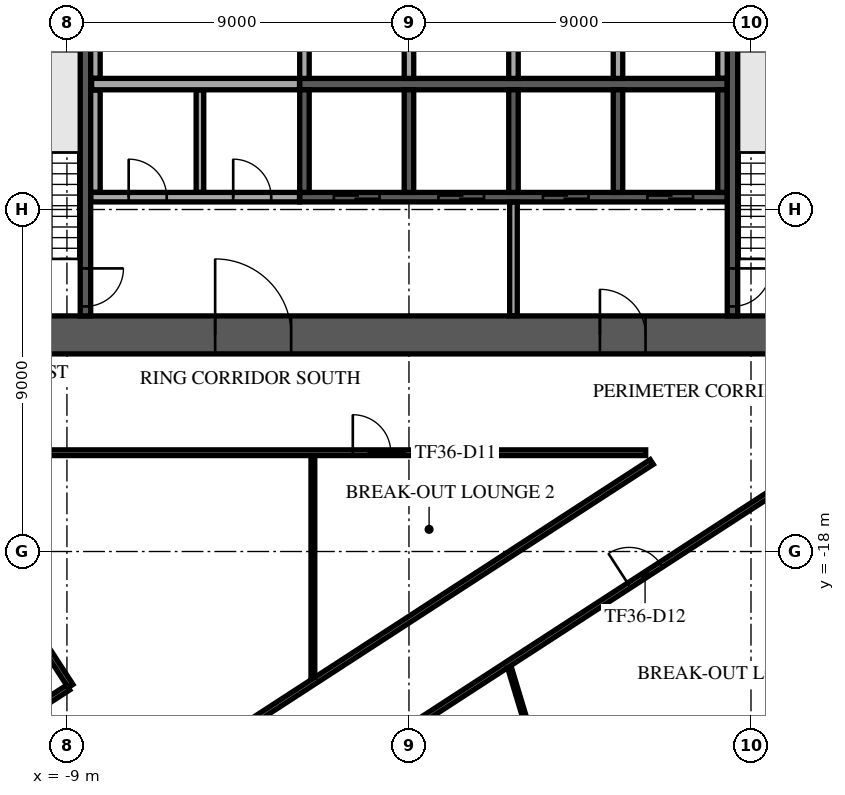
"""IFC4 building model, lengths in metres.
Left out: names, types, materials, properties, quantities, classifications, styles, units other than length and angle.
Written with IfcOpenShell. Run it as: python <this file> out.ifc"""

import sys

from ifc_helpers import new_model, si_unit, direction, frame, frame_2d, origin, place, context, subcontext, project, spatial, rectangle, extrude, element, fill, save


model = new_model("IFC4")
c1 = context("Model", 3, precision=1e-05, world=origin(), true_north=direction((0.0, 1.0)))
c2 = subcontext(c1, "Body", "Model", "MODEL_VIEW")
j1 = project(units=[si_unit("LENGTHUNIT", "METRE"), si_unit("PLANEANGLEUNIT", "RADIAN")], contexts=[c1])
p1 = place(None, origin())
s1 = spatial("IfcSite", under=j1, at=p1, CompositionType="ELEMENT")
p2 = place(p1, origin())
s2 = spatial("IfcBuilding", under=s1, at=p2, CompositionType="ELEMENT")
p3 = place(p2, frame((0.0, 0.0, 155.7)))
s3 = spatial("IfcBuildingStorey", under=s2, at=p3, CompositionType="ELEMENT", Elevation=155.7)
p4 = place(p3, frame((-12.8, -12.3, 0.0), z_axis=(0.0, 0.0, 1.0), x_axis=(1.0, 0.0, 0.0)))
e1 = element("IfcWall", 1, at=p4, inside=s3, PredefinedType="SHEAR", context=c2, shape_type="SweptSolid", body=[
    extrude(rectangle(XDim=25.6, YDim=1.0, at=frame_2d((12.8, 0.0))), origin(), (0.0, 0.0, 1.0), 3.6),
])
p5 = place(p4, frame((7.7, 0.0, 0.0)))
e2 = element("IfcOpeningElement", 2, at=p5, cuts=e1, PredefinedType="OPENING", context=c2, shape_type="SweptSolid", body=[
    extrude(rectangle(XDim=2.0, YDim=2.1, at=frame_2d((1.0, 1.05))), frame((0.0, 0.51, 0.0), z_axis=(0.0, -1.0, 0.0), x_axis=(1.0, 0.0, 0.0)), (0.0, 0.0, 1.0), 1.02),
])
p6 = place(p4, frame((17.825, 0.0, 0.0)))
e3 = element("IfcOpeningElement", 3, at=p6, cuts=e1, PredefinedType="OPENING", context=c2, shape_type="SweptSolid", body=[
    extrude(rectangle(XDim=1.2, YDim=2.1, at=frame_2d((0.6, 1.05))), frame((0.0, 0.51, 0.0), z_axis=(0.0, -1.0, 0.0), x_axis=(1.0, 0.0, 0.0)), (0.0, 0.0, 1.0), 1.02),
])
p7 = place(p4, frame((1.975, 0.0, 0.0)))
e4 = element("IfcOpeningElement", 4, at=p7, cuts=e1, PredefinedType="OPENING", context=c2, shape_type="SweptSolid", body=[
    extrude(rectangle(XDim=1.2, YDim=2.1, at=frame_2d((0.6, 1.05))), frame((0.0, 0.51, 0.0), z_axis=(0.0, -1.0, 0.0), x_axis=(1.0, 0.0, 0.0)), (0.0, 0.0, 1.0), 1.02),
])
p8 = place(p4, frame((22.425, 0.0, 0.0)))
e5 = element("IfcOpeningElement", 5, at=p8, cuts=e1, PredefinedType="OPENING", context=c2, shape_type="SweptSolid", body=[
    extrude(rectangle(XDim=1.2, YDim=2.1, at=frame_2d((0.6, 1.05))), frame((0.0, 0.51, 0.0), z_axis=(0.0, -1.0, 0.0), x_axis=(1.0, 0.0, 0.0)), (0.0, 0.0, 1.0), 1.02),
])
p9 = place(p3, frame((-2.875, -5.7, 0.0), z_axis=(0.0, 0.0, 1.0), x_axis=(1.0, 0.0, 0.0)))
e6 = element("IfcWall", 6, at=p9, inside=s3, PredefinedType="SOLIDWALL", context=c2, shape_type="SweptSolid", body=[
    extrude(rectangle(XDim=11.25, YDim=0.3, at=frame_2d((5.625, 0.0))), origin(), (0.0, 0.0, 1.0), 3.6),
])
for number, where, z_axis, x_axis in (
    (7, (-2.75, -5.55, 0.0), (0.0, 0.0, 1.0), (0.0, 1.0, 0.0)),
    (8, (0.0, -5.55, 0.0), (0.0, 0.0, 1.0), (0.0, 1.0, 0.0)),
    (9, (2.75, -5.55, 0.0), (0.0, 0.0, 1.0), (0.0, 1.0, 0.0)),
    (10, (5.5, -5.55, 0.0), (0.0, 0.0, 1.0), (0.0, 1.0, 0.0)),
):
    element("IfcWall", number, at=place(p3, frame(where, z_axis=z_axis, x_axis=x_axis)), inside=s3, PredefinedType="SOLIDWALL", context=c2, shape_type="SweptSolid", body=[
        extrude(rectangle(XDim=2.7, YDim=0.25, at=frame_2d((1.35, 0.0))), origin(), (0.0, 0.0, 1.0), 3.6),
    ])
p10 = place(p3, frame((-2.875, -8.675, 0.0), z_axis=(0.0, 0.0, 1.0), x_axis=(1.0, 0.0, 0.0)))
e11 = element("IfcWall", 11, at=p10, inside=s3, PredefinedType="SOLIDWALL", context=c2, shape_type="SweptSolid", body=[
    extrude(rectangle(XDim=11.25, YDim=0.25, at=frame_2d((5.625, 0.0))), origin(), (0.0, 0.0, 1.0), 3.6),
])
p11 = place(p10, frame((0.9, 0.0, 0.0)))
e12 = element("IfcOpeningElement", 12, at=p11, cuts=e11, PredefinedType="OPENING", context=c2, shape_type="SweptSolid", body=[
    extrude(rectangle(XDim=1.2, YDim=2.1, at=frame_2d((0.6, 1.05))), frame((0.0, 0.135, 0.0), z_axis=(0.0, -1.0, 0.0), x_axis=(1.0, 0.0, 0.0)), (0.0, 0.0, 1.0), 0.27),
])
p12 = place(p10, frame((3.65, 0.0, 0.0)))
e13 = element("IfcOpeningElement", 13, at=p12, cuts=e11, PredefinedType="OPENING", context=c2, shape_type="SweptSolid", body=[
    extrude(rectangle(XDim=1.2, YDim=2.1, at=frame_2d((0.6, 1.05))), frame((0.0, 0.135, 0.0), z_axis=(0.0, -1.0, 0.0), x_axis=(1.0, 0.0, 0.0)), (0.0, 0.0, 1.0), 0.27),
])
p13 = place(p10, frame((6.4, 0.0, 0.0)))
e14 = element("IfcOpeningElement", 14, at=p13, cuts=e11, PredefinedType="OPENING", context=c2, shape_type="SweptSolid", body=[
    extrude(rectangle(XDim=1.2, YDim=2.1, at=frame_2d((0.6, 1.05))), frame((0.0, 0.135, 0.0), z_axis=(0.0, -1.0, 0.0), x_axis=(1.0, 0.0, 0.0)), (0.0, 0.0, 1.0), 0.27),
])
p14 = place(p10, frame((9.15, 0.0, 0.0)))
e15 = element("IfcOpeningElement", 15, at=p14, cuts=e11, PredefinedType="OPENING", context=c2, shape_type="SweptSolid", body=[
    extrude(rectangle(XDim=1.2, YDim=2.1, at=frame_2d((0.6, 1.05))), frame((0.0, 0.135, 0.0), z_axis=(0.0, -1.0, 0.0), x_axis=(1.0, 0.0, 0.0)), (0.0, 0.0, 1.0), 0.27),
])
for number, where, z_axis, x_axis in (
    (16, (-2.75, -8.55, 0.0), (0.0, 0.0, 1.0), (0.0, 1.0, 0.0)),
    (17, (0.0, -8.55, 0.0), (0.0, 0.0, 1.0), (0.0, 1.0, 0.0)),
    (18, (2.75, -8.55, 0.0), (0.0, 0.0, 1.0), (0.0, 1.0, 0.0)),
    (19, (5.5, -8.55, 0.0), (0.0, 0.0, 1.0), (0.0, 1.0, 0.0)),
    (20, (8.25, -8.55, 0.0), (0.0, 0.0, 1.0), (0.0, 1.0, 0.0)),
):
    element("IfcWall", number, at=place(p3, frame(where, z_axis=z_axis, x_axis=x_axis)), inside=s3, PredefinedType="SOLIDWALL", context=c2, shape_type="SweptSolid", body=[
        extrude(rectangle(XDim=2.7, YDim=0.25, at=frame_2d((1.35, 0.0))), origin(), (0.0, 0.0, 1.0), 3.6),
    ])
p15 = place(p3, frame((-8.512, -4.55, 0.0), z_axis=(0.0, 0.0, 1.0), x_axis=(0.0, -1.0, 0.0)))
e21 = element("IfcWall", 21, at=p15, inside=s3, PredefinedType="SOLIDWALL", context=c2, shape_type="SweptSolid", body=[
    extrude(rectangle(XDim=7.25, YDim=0.275, at=frame_2d((3.625, 0.0))), origin(), (0.0, 0.0, 1.0), 3.6),
])
p16 = place(p15, frame((6.0, 0.0, 0.0)))
e22 = element("IfcOpeningElement", 22, at=p16, cuts=e21, PredefinedType="OPENING", context=c2, shape_type="SweptSolid", body=[
    extrude(rectangle(XDim=1.0, YDim=2.1, at=frame_2d((0.5, 1.05))), frame((0.0, 0.147, 0.0), z_axis=(0.0, -1.0, 0.0), x_axis=(1.0, 0.0, 0.0)), (0.0, 0.0, 1.0), 0.295),
])
p17 = place(p3, frame((8.512, -4.55, 0.0), z_axis=(0.0, 0.0, 1.0), x_axis=(0.0, -1.0, 0.0)))
e23 = element("IfcWall", 23, at=p17, inside=s3, PredefinedType="SOLIDWALL", context=c2, shape_type="SweptSolid", body=[
    extrude(rectangle(XDim=7.25, YDim=0.275, at=frame_2d((3.625, 0.0))), origin(), (0.0, 0.0, 1.0), 3.6),
])
p18 = place(p17, frame((6.0, 0.0, 0.0)))
e24 = element("IfcOpeningElement", 24, at=p18, cuts=e23, PredefinedType="OPENING", context=c2, shape_type="SweptSolid", body=[
    extrude(rectangle(XDim=1.0, YDim=2.1, at=frame_2d((0.5, 1.05))), frame((0.0, 0.147, 0.0), z_axis=(0.0, -1.0, 0.0), x_axis=(1.0, 0.0, 0.0)), (0.0, 0.0, 1.0), 0.295),
])
p19 = place(p3, frame((2.75, -11.795, 0.0), z_axis=(0.0, 0.0, 1.0), x_axis=(0.0, 1.0, 0.0)))
e25 = element("IfcWall", 25, at=p19, inside=s3, PredefinedType="PARTITIONING", context=c2, shape_type="SweptSolid", body=[
    extrude(rectangle(XDim=2.99, YDim=0.2, at=frame_2d((1.495, 0.0))), origin(), (0.0, 0.0, 1.0), 3.6),
])
p20 = place(p3, frame((-8.37, -8.675, 0.0), z_axis=(0.0, 0.0, 1.0), x_axis=(1.0, 0.0, 0.0)))
e26 = element("IfcWall", 26, at=p20, inside=s3, PredefinedType="PARTITIONING", context=c2, shape_type="SweptSolid", body=[
    extrude(rectangle(XDim=5.49, YDim=0.25, at=frame_2d((2.745, 0.0))), origin(), (0.0, 0.0, 1.0), 3.6),
])
p21 = place(p20, frame((0.995, 0.0, 0.0)))
e27 = element("IfcOpeningElement", 27, at=p21, cuts=e26, PredefinedType="OPENING", context=c2, shape_type="SweptSolid", body=[
    extrude(rectangle(XDim=1.0, YDim=2.1, at=frame_2d((0.5, 1.05))), frame((0.0, 0.135, 0.0), z_axis=(0.0, -1.0, 0.0), x_axis=(1.0, 0.0, 0.0)), (0.0, 0.0, 1.0), 0.27),
])
p22 = place(p20, frame((3.745, 0.0, 0.0)))
e28 = element("IfcOpeningElement", 28, at=p22, cuts=e26, PredefinedType="OPENING", context=c2, shape_type="SweptSolid", body=[
    extrude(rectangle(XDim=1.0, YDim=2.1, at=frame_2d((0.5, 1.05))), frame((0.0, 0.135, 0.0), z_axis=(0.0, -1.0, 0.0), x_axis=(1.0, 0.0, 0.0)), (0.0, 0.0, 1.0), 0.27),
])
p23 = place(p3, frame((-8.25, -8.545, 0.0), z_axis=(0.0, 0.0, 1.0), x_axis=(0.0, 1.0, 0.0)))
e29 = element("IfcWall", 29, at=p23, inside=s3, PredefinedType="PARTITIONING", context=c2, shape_type="SweptSolid", body=[
    extrude(rectangle(XDim=2.69, YDim=0.25, at=frame_2d((1.345, 0.0))), origin(), (0.0, 0.0, 1.0), 3.6),
])
p24 = place(p3, frame((-5.5, -8.545, 0.0), z_axis=(0.0, 0.0, 1.0), x_axis=(0.0, 1.0, 0.0)))
e30 = element("IfcWall", 30, at=p24, inside=s3, PredefinedType="PARTITIONING", context=c2, shape_type="SweptSolid", body=[
    extrude(rectangle(XDim=2.69, YDim=0.2, at=frame_2d((1.345, 0.0))), origin(), (0.0, 0.0, 1.0), 3.6),
])
p25 = place(p3, frame((-8.35, -5.7, 0.0), z_axis=(0.0, 0.0, 1.0), x_axis=(1.0, 0.0, 0.0)))
e31 = element("IfcWall", 31, at=p25, inside=s3, PredefinedType="PARTITIONING", context=c2, shape_type="SweptSolid", body=[
    extrude(rectangle(XDim=5.47, YDim=0.3, at=frame_2d((2.735, 0.0))), origin(), (0.0, 0.0, 1.0), 3.6),
])
for number, where, z_axis, x_axis in (
    (32, (-8.25, -5.545, 0.0), (0.0, 0.0, 1.0), (0.0, 1.0, 0.0)),
    (33, (8.25, -5.545, 0.0), (0.0, 0.0, 1.0), (0.0, 1.0, 0.0)),
):
    element("IfcWall", number, at=place(p3, frame(where, z_axis=z_axis, x_axis=x_axis)), inside=s3, PredefinedType="PARTITIONING", context=c2, shape_type="SweptSolid", body=[
        extrude(rectangle(XDim=2.69, YDim=0.25, at=frame_2d((1.345, 0.0))), origin(), (0.0, 0.0, 1.0), 3.6),
    ])
p26 = place(p3, frame((-6.647, -35.438, 0.0), z_axis=(0.0, 0.0, 1.0), x_axis=(0.838672034147, 0.544636777257, 0.0)))
e34 = element("IfcWall", 34, at=p26, inside=s3, PredefinedType="STANDARD", context=c2, shape_type="SweptSolid", body=[
    extrude(rectangle(XDim=49.751, YDim=0.6, at=frame_2d((24.876, 0.0))), origin(), (0.0, 0.0, 1.0), 3.6),
])
p27 = place(p26, frame((1.161, 0.0, 0.9)))
e35 = element("IfcOpeningElement", 35, at=p27, cuts=e34, PredefinedType="OPENING", context=c2, shape_type="SweptSolid", body=[
    extrude(rectangle(XDim=2.1, YDim=2.1, at=frame_2d((1.05, 1.05))), frame((0.0, 0.31, 0.0), z_axis=(0.0, -1.0, 0.0), x_axis=(1.0, 0.0, 0.0)), (0.0, 0.0, 1.0), 0.62),
])
p28 = place(p26, frame((5.644, 0.0, 0.9)))
e36 = element("IfcOpeningElement", 36, at=p28, cuts=e34, PredefinedType="OPENING", context=c2, shape_type="SweptSolid", body=[
    extrude(rectangle(XDim=2.1, YDim=2.1, at=frame_2d((1.05, 1.05))), frame((0.0, 0.31, 0.0), z_axis=(0.0, -1.0, 0.0), x_axis=(1.0, 0.0, 0.0)), (0.0, 0.0, 1.0), 0.62),
])
p29 = place(p26, frame((10.189, 0.0, 0.9)))
e37 = element("IfcOpeningElement", 37, at=p29, cuts=e34, PredefinedType="OPENING", context=c2, shape_type="SweptSolid", body=[
    extrude(rectangle(XDim=2.1, YDim=2.1, at=frame_2d((1.05, 1.05))), frame((0.0, 0.31, 0.0), z_axis=(0.0, -1.0, 0.0), x_axis=(1.0, 0.0, 0.0)), (0.0, 0.0, 1.0), 0.62),
])
p30 = place(p26, frame((14.735, 0.0, 0.9)))
e38 = element("IfcOpeningElement", 38, at=p30, cuts=e34, PredefinedType="OPENING", context=c2, shape_type="SweptSolid", body=[
    extrude(rectangle(XDim=2.1, YDim=2.1, at=frame_2d((1.05, 1.05))), frame((0.0, 0.31, 0.0), z_axis=(0.0, -1.0, 0.0), x_axis=(1.0, 0.0, 0.0)), (0.0, 0.0, 1.0), 0.62),
])
p31 = place(p26, frame((19.28, 0.0, 0.9)))
e39 = element("IfcOpeningElement", 39, at=p31, cuts=e34, PredefinedType="OPENING", context=c2, shape_type="SweptSolid", body=[
    extrude(rectangle(XDim=2.1, YDim=2.1, at=frame_2d((1.05, 1.05))), frame((0.0, 0.31, 0.0), z_axis=(0.0, -1.0, 0.0), x_axis=(1.0, 0.0, 0.0)), (0.0, 0.0, 1.0), 0.62),
])
p32 = place(p26, frame((23.826, 0.0, 0.9)))
e40 = element("IfcOpeningElement", 40, at=p32, cuts=e34, PredefinedType="OPENING", context=c2, shape_type="SweptSolid", body=[
    extrude(rectangle(XDim=2.1, YDim=2.1, at=frame_2d((1.05, 1.05))), frame((0.0, 0.31, 0.0), z_axis=(0.0, -1.0, 0.0), x_axis=(1.0, 0.0, 0.0)), (0.0, 0.0, 1.0), 0.62),
])
p33 = place(p26, frame((28.371, 0.0, 0.9)))
e41 = element("IfcOpeningElement", 41, at=p33, cuts=e34, PredefinedType="OPENING", context=c2, shape_type="SweptSolid", body=[
    extrude(rectangle(XDim=2.1, YDim=2.1, at=frame_2d((1.05, 1.05))), frame((0.0, 0.31, 0.0), z_axis=(0.0, -1.0, 0.0), x_axis=(1.0, 0.0, 0.0)), (0.0, 0.0, 1.0), 0.62),
])
p34 = place(p26, frame((32.917, 0.0, 0.9)))
e42 = element("IfcOpeningElement", 42, at=p34, cuts=e34, PredefinedType="OPENING", context=c2, shape_type="SweptSolid", body=[
    extrude(rectangle(XDim=2.1, YDim=2.1, at=frame_2d((1.05, 1.05))), frame((0.0, 0.31, 0.0), z_axis=(0.0, -1.0, 0.0), x_axis=(1.0, 0.0, 0.0)), (0.0, 0.0, 1.0), 0.62),
])
p35 = place(p26, frame((37.462, 0.0, 0.9)))
e43 = element("IfcOpeningElement", 43, at=p35, cuts=e34, PredefinedType="OPENING", context=c2, shape_type="SweptSolid", body=[
    extrude(rectangle(XDim=2.1, YDim=2.1, at=frame_2d((1.05, 1.05))), frame((0.0, 0.31, 0.0), z_axis=(0.0, -1.0, 0.0), x_axis=(1.0, 0.0, 0.0)), (0.0, 0.0, 1.0), 0.62),
])
p36 = place(p26, frame((42.008, 0.0, 0.9)))
e44 = element("IfcOpeningElement", 44, at=p36, cuts=e34, PredefinedType="OPENING", context=c2, shape_type="SweptSolid", body=[
    extrude(rectangle(XDim=2.1, YDim=2.1, at=frame_2d((1.05, 1.05))), frame((0.0, 0.31, 0.0), z_axis=(0.0, -1.0, 0.0), x_axis=(1.0, 0.0, 0.0)), (0.0, 0.0, 1.0), 0.62),
])
p37 = place(p26, frame((46.491, 0.0, 0.9)))
e45 = element("IfcOpeningElement", 45, at=p37, cuts=e34, PredefinedType="OPENING", context=c2, shape_type="SweptSolid", body=[
    extrude(rectangle(XDim=2.1, YDim=2.1, at=frame_2d((1.05, 1.05))), frame((0.0, 0.31, 0.0), z_axis=(0.0, -1.0, 0.0), x_axis=(1.0, 0.0, 0.0)), (0.0, 0.0, 1.0), 0.62),
])
p38 = place(p3, frame((-12.891, -15.4, 0.0), z_axis=(0.0, 0.0, 1.0), x_axis=(0.544568574612, -0.838716321258, 0.0)))
e46 = element("IfcWall", 46, at=p38, inside=s3, PredefinedType="PARTITIONING", context=c2, shape_type="SweptSolid", body=[
    extrude(rectangle(XDim=7.32, YDim=0.15, at=frame_2d((3.66, 0.0))), origin(), (0.0, 0.0, 1.0), 3.15),
])
p39 = place(p3, frame((-12.753, -15.4, 0.0), z_axis=(0.0, 0.0, 1.0), x_axis=(1.0, 0.0, 0.0)))
e47 = element("IfcWall", 47, at=p39, inside=s3, PredefinedType="PARTITIONING", context=c2, shape_type="SweptSolid", body=[
    extrude(rectangle(XDim=18.982, YDim=0.15, at=frame_2d((9.491, 0.0))), origin(), (0.0, 0.0, 1.0), 3.15),
])
p40 = place(p39, frame((11.275, 0.0, 0.0)))
e48 = element("IfcOpeningElement", 48, at=p40, cuts=e47, PredefinedType="OPENING", context=c2, shape_type="SweptSolid", body=[
    extrude(rectangle(XDim=1.0, YDim=2.1, at=frame_2d((0.5, 1.05))), frame((0.0, 0.085, 0.0), z_axis=(0.0, -1.0, 0.0), x_axis=(1.0, 0.0, 0.0)), (0.0, 0.0, 1.0), 0.17),
])
p41 = place(p3, frame((-10.854, -22.805, 0.0), z_axis=(0.0, 0.0, 1.0), x_axis=(0.838555201952, 0.544816641889, 0.0)))
e49 = element("IfcWall", 49, at=p41, inside=s3, PredefinedType="PARTITIONING", context=c2, shape_type="SweptSolid", body=[
    extrude(rectangle(XDim=2.249, YDim=0.15, at=frame_2d((1.125, 0.0))), origin(), (0.0, 0.0, 1.0), 3.6),
])
p42 = place(p3, frame((-5.746, -23.524, 0.0), z_axis=(0.0, 0.0, 1.0), x_axis=(0.838672161822, 0.544636580652, 0.0)))
e50 = element("IfcWall", 50, at=p42, inside=s3, PredefinedType="PARTITIONING", context=c2, shape_type="SweptSolid", body=[
    extrude(rectangle(XDim=14.468, YDim=0.15, at=frame_2d((7.234, 0.0))), origin(), (0.0, 0.0, 1.0), 3.15),
])
p43 = place(p3, frame((-4.376, -25.496, 0.0), z_axis=(0.0, 0.0, 1.0), x_axis=(0.838659454634, 0.544656147631, 0.0)))
e51 = element("IfcWall", 51, at=p43, inside=s3, PredefinedType="PARTITIONING", context=c2, shape_type="SweptSolid", body=[
    extrude(rectangle(XDim=35.188, YDim=0.15, at=frame_2d((17.594, 0.0))), origin(), (0.0, 0.0, 1.0), 3.15),
])
p44 = place(p43, frame((2.55, 0.0, 0.0)))
e52 = element("IfcOpeningElement", 52, at=p44, cuts=e51, PredefinedType="OPENING", context=c2, shape_type="SweptSolid", body=[
    extrude(rectangle(XDim=1.0, YDim=2.1, at=frame_2d((0.5, 1.05))), frame((0.0, 0.085, 0.0), z_axis=(0.0, -1.0, 0.0), x_axis=(1.0, 0.0, 0.0)), (0.0, 0.0, 1.0), 0.17),
])
p45 = place(p43, frame((12.126, 0.0, 0.0)))
e53 = element("IfcOpeningElement", 53, at=p45, cuts=e51, PredefinedType="OPENING", context=c2, shape_type="SweptSolid", body=[
    extrude(rectangle(XDim=1.0, YDim=2.1, at=frame_2d((0.5, 1.05))), frame((0.0, 0.085, 0.0), z_axis=(0.0, -1.0, 0.0), x_axis=(1.0, 0.0, 0.0)), (0.0, 0.0, 1.0), 0.17),
])
p46 = place(p43, frame((25.759, 0.0, 0.0)))
e54 = element("IfcOpeningElement", 54, at=p46, cuts=e51, PredefinedType="OPENING", context=c2, shape_type="SweptSolid", body=[
    extrude(rectangle(XDim=1.0, YDim=2.1, at=frame_2d((0.5, 1.05))), frame((0.0, 0.085, 0.0), z_axis=(0.0, -1.0, 0.0), x_axis=(1.0, 0.0, 0.0)), (0.0, 0.0, 1.0), 0.17),
])
p47 = place(p3, frame((-2.528, -21.312, 0.0), z_axis=(0.0, 0.0, 1.0), x_axis=(0.0, 1.0, 0.0)))
e55 = element("IfcWall", 55, at=p47, inside=s3, PredefinedType="PARTITIONING", context=c2, shape_type="SweptSolid", body=[
    extrude(rectangle(XDim=5.837, YDim=0.1, at=frame_2d((2.918, 0.0))), origin(), (0.0, 0.0, 1.0), 3.6),
])
p48 = place(p3, frame((2.643, -21.044, 0.0), z_axis=(0.0, 0.0, 1.0), x_axis=(0.289254732228, -0.957252161076, 0.0)))
e56 = element("IfcWall", 56, at=p48, inside=s3, PredefinedType="PARTITIONING", context=c2, shape_type="SweptSolid", body=[
    extrude(rectangle(XDim=6.987, YDim=0.1, at=frame_2d((3.493, 0.0))), origin(), (0.0, 0.0, 1.0), 2.9),
])
p49 = place(p5, origin())
e57 = element("IfcDoor", 57, at=p49, inside=s3, OperationType="SINGLE_SWING_LEFT", PredefinedType="DOOR", context=c2, shape_type="SweptSolid", body=[
    extrude(rectangle(XDim=2.0, YDim=2.1, at=frame_2d((1.0, 1.05))), frame((0.0, 0.025, 0.0), z_axis=(0.0, -1.0, 0.0), x_axis=(1.0, 0.0, 0.0)), (0.0, 0.0, 1.0), 0.05),
])
fill(e2, e57)
p50 = place(p6, origin())
e58 = element("IfcDoor", 58, at=p50, inside=s3, OperationType="SINGLE_SWING_LEFT", PredefinedType="DOOR", context=c2, shape_type="SweptSolid", body=[
    extrude(rectangle(XDim=1.2, YDim=2.1, at=frame_2d((0.6, 1.05))), frame((0.0, 0.025, 0.0), z_axis=(0.0, -1.0, 0.0), x_axis=(1.0, 0.0, 0.0)), (0.0, 0.0, 1.0), 0.05),
])
fill(e3, e58)
p51 = place(p11, origin())
e59 = element("IfcDoor", 59, at=p51, inside=s3, OperationType="DOUBLE_DOOR_SLIDING", PredefinedType="DOOR", context=c2, shape_type="SweptSolid", body=[
    extrude(rectangle(XDim=1.2, YDim=2.1, at=frame_2d((0.6, 1.05))), frame((0.0, 0.025, 0.0), z_axis=(0.0, -1.0, 0.0), x_axis=(1.0, 0.0, 0.0)), (0.0, 0.0, 1.0), 0.05),
])
fill(e12, e59)
p52 = place(p12, origin())
e60 = element("IfcDoor", 60, at=p52, inside=s3, OperationType="DOUBLE_DOOR_SLIDING", PredefinedType="DOOR", context=c2, shape_type="SweptSolid", body=[
    extrude(rectangle(XDim=1.2, YDim=2.1, at=frame_2d((0.6, 1.05))), frame((0.0, 0.025, 0.0), z_axis=(0.0, -1.0, 0.0), x_axis=(1.0, 0.0, 0.0)), (0.0, 0.0, 1.0), 0.05),
])
fill(e13, e60)
p53 = place(p13, origin())
e61 = element("IfcDoor", 61, at=p53, inside=s3, OperationType="DOUBLE_DOOR_SLIDING", PredefinedType="DOOR", context=c2, shape_type="SweptSolid", body=[
    extrude(rectangle(XDim=1.2, YDim=2.1, at=frame_2d((0.6, 1.05))), frame((0.0, 0.025, 0.0), z_axis=(0.0, -1.0, 0.0), x_axis=(1.0, 0.0, 0.0)), (0.0, 0.0, 1.0), 0.05),
])
fill(e14, e61)
p54 = place(p14, origin())
e62 = element("IfcDoor", 62, at=p54, inside=s3, OperationType="DOUBLE_DOOR_SLIDING", PredefinedType="DOOR", context=c2, shape_type="SweptSolid", body=[
    extrude(rectangle(XDim=1.2, YDim=2.1, at=frame_2d((0.6, 1.05))), frame((0.0, 0.025, 0.0), z_axis=(0.0, -1.0, 0.0), x_axis=(1.0, 0.0, 0.0)), (0.0, 0.0, 1.0), 0.05),
])
fill(e15, e62)
p55 = place(p16, origin())
e63 = element("IfcDoor", 63, at=p55, inside=s3, OperationType="SINGLE_SWING_LEFT", PredefinedType="DOOR", context=c2, shape_type="SweptSolid", body=[
    extrude(rectangle(XDim=1.0, YDim=2.1, at=frame_2d((0.5, 1.05))), frame((0.0, 0.025, 0.0), z_axis=(0.0, -1.0, 0.0), x_axis=(1.0, 0.0, 0.0)), (0.0, 0.0, 1.0), 0.05),
])
fill(e22, e63)
p56 = place(p18, origin())
e64 = element("IfcDoor", 64, at=p56, inside=s3, OperationType="SINGLE_SWING_LEFT", PredefinedType="DOOR", context=c2, shape_type="SweptSolid", body=[
    extrude(rectangle(XDim=1.0, YDim=2.1, at=frame_2d((0.5, 1.05))), frame((0.0, 0.025, 0.0), z_axis=(0.0, -1.0, 0.0), x_axis=(1.0, 0.0, 0.0)), (0.0, 0.0, 1.0), 0.05),
])
fill(e24, e64)
p57 = place(p21, origin())
e65 = element("IfcDoor", 65, at=p57, inside=s3, OperationType="SINGLE_SWING_LEFT", PredefinedType="DOOR", context=c2, shape_type="SweptSolid", body=[
    extrude(rectangle(XDim=1.0, YDim=2.1, at=frame_2d((0.5, 1.05))), frame((0.0, 0.025, 0.0), z_axis=(0.0, -1.0, 0.0), x_axis=(1.0, 0.0, 0.0)), (0.0, 0.0, 1.0), 0.05),
])
fill(e27, e65)
p58 = place(p22, origin())
e66 = element("IfcDoor", 66, at=p58, inside=s3, OperationType="SINGLE_SWING_LEFT", PredefinedType="DOOR", context=c2, shape_type="SweptSolid", body=[
    extrude(rectangle(XDim=1.0, YDim=2.1, at=frame_2d((0.5, 1.05))), frame((0.0, 0.025, 0.0), z_axis=(0.0, -1.0, 0.0), x_axis=(1.0, 0.0, 0.0)), (0.0, 0.0, 1.0), 0.05),
])
fill(e28, e66)
p59 = place(p40, frame((1.0, 0.0, 0.0), z_axis=(0.0, 0.0, 1.0), x_axis=(-1.0, 0.0, 0.0)))
e67 = element("IfcDoor", 67, at=p59, inside=s3, OperationType="SINGLE_SWING_LEFT", PredefinedType="DOOR", context=c2, shape_type="SweptSolid", body=[
    extrude(rectangle(XDim=1.0, YDim=2.1, at=frame_2d((0.5, 1.05))), frame((0.0, 0.025, 0.0), z_axis=(0.0, -1.0, 0.0), x_axis=(1.0, 0.0, 0.0)), (0.0, 0.0, 1.0), 0.05),
])
fill(e48, e67)
p60 = place(p45, frame((1.0, 0.0, 0.0), z_axis=(0.0, 0.0, 1.0), x_axis=(-1.0, 0.0, 0.0)))
e68 = element("IfcDoor", 68, at=p60, inside=s3, OperationType="SINGLE_SWING_LEFT", PredefinedType="DOOR", context=c2, shape_type="SweptSolid", body=[
    extrude(rectangle(XDim=1.0, YDim=2.1, at=frame_2d((0.5, 1.05))), frame((0.0, 0.025, 0.0), z_axis=(0.0, -1.0, 0.0), x_axis=(1.0, 0.0, 0.0)), (0.0, 0.0, 1.0), 0.05),
])
fill(e53, e68)
save(model, sys.argv[1])
